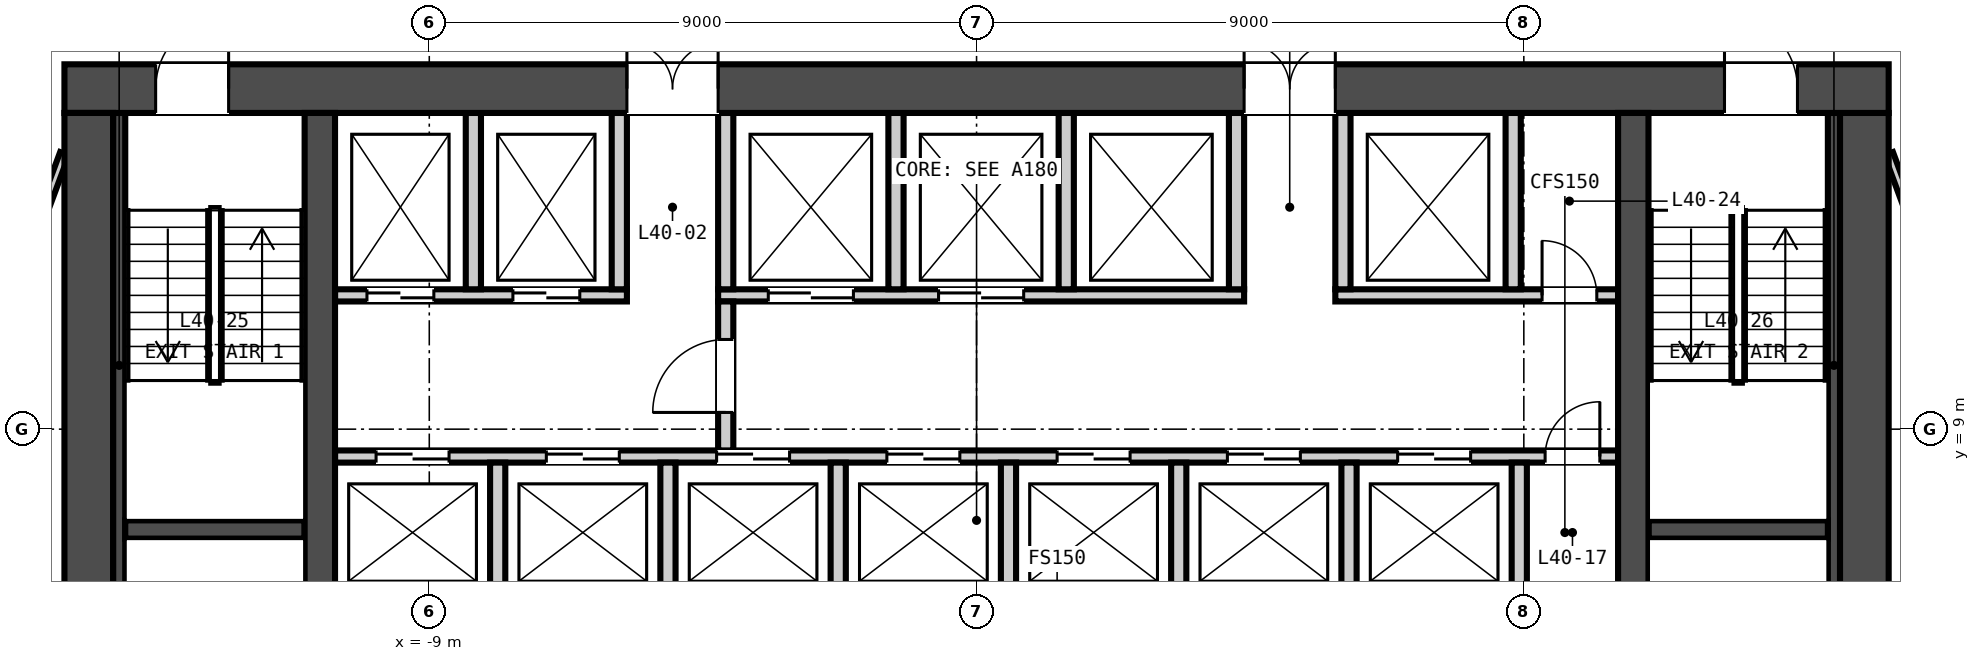
"""IFC4 building model, lengths in metres.
Left out: names, types, materials, properties, quantities, classifications, styles, units other than length and angle.
Written with IfcOpenShell. Run it as: python <this file> out.ifc"""

import sys

from ifc_helpers import new_model, si_unit, direction, frame, frame_2d, origin, place, context, subcontext, project, spatial, rectangle, extrude, element, fill, save


model = new_model("IFC4")
c1 = context("Model", 3, precision=1e-05, world=origin(), true_north=direction((0.0, 1.0)))
c2 = subcontext(c1, "Body", "Model", "MODEL_VIEW")
j1 = project(units=[si_unit("LENGTHUNIT", "METRE"), si_unit("PLANEANGLEUNIT", "RADIAN")], contexts=[c1])
p1 = place(None, origin())
s1 = spatial("IfcSite", under=j1, at=p1, CompositionType="ELEMENT")
p2 = place(p1, origin())
s2 = spatial("IfcBuilding", under=s1, at=p2, CompositionType="ELEMENT")
p3 = place(p2, frame((0.0, 0.0, 162.65)))
s3 = spatial("IfcBuildingStorey", under=s2, at=p3, CompositionType="ELEMENT", Elevation=162.65)
p4 = place(p3, frame((-15.0, 14.6, -0.15), z_axis=(0.0, 0.0, 1.0), x_axis=(1.0, 0.0, 0.0)))
e1 = element("IfcWall", 1, at=p4, inside=s3, PredefinedType="SOLIDWALL", context=c2, shape_type="SweptSolid", body=[
    extrude(rectangle(XDim=30.0, YDim=0.8, at=frame_2d((15.0, 0.0))), origin(), (0.0, 0.0, 1.0), 3.5),
])
p5 = place(p4, frame((9.25, 0.0, 0.15)))
e2 = element("IfcOpeningElement", 2, at=p5, cuts=e1, PredefinedType="OPENING", context=c2, shape_type="SweptSolid", body=[
    extrude(rectangle(XDim=1.5, YDim=2.1, at=frame_2d((0.75, 1.05))), frame((0.0, 0.41, 0.0), z_axis=(0.0, -1.0, 0.0), x_axis=(1.0, 0.0, 0.0)), (0.0, 0.0, 1.0), 0.82),
])
p6 = place(p4, frame((19.4, 0.0, 0.15)))
e3 = element("IfcOpeningElement", 3, at=p6, cuts=e1, PredefinedType="OPENING", context=c2, shape_type="SweptSolid", body=[
    extrude(rectangle(XDim=1.5, YDim=2.1, at=frame_2d((0.75, 1.05))), frame((0.0, 0.41, 0.0), z_axis=(0.0, -1.0, 0.0), x_axis=(1.0, 0.0, 0.0)), (0.0, 0.0, 1.0), 0.82),
])
p7 = place(p4, frame((1.5, 0.0, 0.15)))
e4 = element("IfcOpeningElement", 4, at=p7, cuts=e1, PredefinedType="OPENING", context=c2, shape_type="SweptSolid", body=[
    extrude(rectangle(XDim=1.2, YDim=2.1, at=frame_2d((0.6, 1.05))), frame((0.0, 0.41, 0.0), z_axis=(0.0, -1.0, 0.0), x_axis=(1.0, 0.0, 0.0)), (0.0, 0.0, 1.0), 0.82),
])
p8 = place(p4, frame((27.3, 0.0, 0.15)))
e5 = element("IfcOpeningElement", 5, at=p8, cuts=e1, PredefinedType="OPENING", context=c2, shape_type="SweptSolid", body=[
    extrude(rectangle(XDim=1.2, YDim=2.1, at=frame_2d((0.6, 1.05))), frame((0.0, 0.41, 0.0), z_axis=(0.0, -1.0, 0.0), x_axis=(1.0, 0.0, 0.0)), (0.0, 0.0, 1.0), 0.82),
])
for number, where, z_axis, x_axis in (
    (6, (-14.6, 0.8, -0.15), (0.0, 0.0, 1.0), (0.0, 1.0, 0.0)),
    (7, (14.6, 0.8, -0.15), (0.0, 0.0, 1.0), (0.0, 1.0, 0.0)),
):
    element("IfcWall", number, at=place(p3, frame(where, z_axis=z_axis, x_axis=x_axis)), inside=s3, PredefinedType="SOLIDWALL", context=c2, shape_type="SweptSolid", body=[
        extrude(rectangle(XDim=13.4, YDim=0.8, at=frame_2d((6.7, 0.0))), origin(), (0.0, 0.0, 1.0), 3.5),
    ])
for number, where, z_axis, x_axis in (
    (8, (-10.8, 0.8, -0.15), (0.0, 0.0, 1.0), (0.0, 1.0, 0.0)),
    (9, (10.8, 0.8, -0.15), (0.0, 0.0, 1.0), (0.0, 1.0, 0.0)),
):
    element("IfcWall", number, at=place(p3, frame(where, z_axis=z_axis, x_axis=x_axis)), inside=s3, PredefinedType="SOLIDWALL", context=c2, shape_type="SweptSolid", body=[
        extrude(rectangle(XDim=13.4, YDim=0.5, at=frame_2d((6.7, 0.0))), origin(), (0.0, 0.0, 1.0), 3.5),
    ])
p9 = place(p3, frame((-10.55, 8.55, 0.0), z_axis=(0.0, 0.0, 1.0), x_axis=(1.0, 0.0, 0.0)))
e10 = element("IfcWall", 10, at=p9, inside=s3, PredefinedType="PARTITIONING", context=c2, shape_type="SweptSolid", body=[
    extrude(rectangle(XDim=21.1, YDim=0.2, at=frame_2d((10.55, 0.0))), origin(), (0.0, 0.0, 1.0), 3.35),
])
p10 = place(p9, frame((0.675, 0.0, 0.0)))
e11 = element("IfcOpeningElement", 11, at=p10, cuts=e10, PredefinedType="OPENING", context=c2, shape_type="SweptSolid", body=[
    extrude(rectangle(XDim=1.2, YDim=2.1, at=frame_2d((0.6, 1.05))), frame((0.0, 0.11, 0.0), z_axis=(0.0, -1.0, 0.0), x_axis=(1.0, 0.0, 0.0)), (0.0, 0.0, 1.0), 0.22),
])
p11 = place(p9, frame((3.475, 0.0, 0.0)))
e12 = element("IfcOpeningElement", 12, at=p11, cuts=e10, PredefinedType="OPENING", context=c2, shape_type="SweptSolid", body=[
    extrude(rectangle(XDim=1.2, YDim=2.1, at=frame_2d((0.6, 1.05))), frame((0.0, 0.11, 0.0), z_axis=(0.0, -1.0, 0.0), x_axis=(1.0, 0.0, 0.0)), (0.0, 0.0, 1.0), 0.22),
])
p12 = place(p9, frame((6.275, 0.0, 0.0)))
e13 = element("IfcOpeningElement", 13, at=p12, cuts=e10, PredefinedType="OPENING", context=c2, shape_type="SweptSolid", body=[
    extrude(rectangle(XDim=1.2, YDim=2.1, at=frame_2d((0.6, 1.05))), frame((0.0, 0.11, 0.0), z_axis=(0.0, -1.0, 0.0), x_axis=(1.0, 0.0, 0.0)), (0.0, 0.0, 1.0), 0.22),
])
p13 = place(p9, frame((9.075, 0.0, 0.0)))
e14 = element("IfcOpeningElement", 14, at=p13, cuts=e10, PredefinedType="OPENING", context=c2, shape_type="SweptSolid", body=[
    extrude(rectangle(XDim=1.2, YDim=2.1, at=frame_2d((0.6, 1.05))), frame((0.0, 0.11, 0.0), z_axis=(0.0, -1.0, 0.0), x_axis=(1.0, 0.0, 0.0)), (0.0, 0.0, 1.0), 0.22),
])
p14 = place(p9, frame((11.875, 0.0, 0.0)))
e15 = element("IfcOpeningElement", 15, at=p14, cuts=e10, PredefinedType="OPENING", context=c2, shape_type="SweptSolid", body=[
    extrude(rectangle(XDim=1.2, YDim=2.1, at=frame_2d((0.6, 1.05))), frame((0.0, 0.11, 0.0), z_axis=(0.0, -1.0, 0.0), x_axis=(1.0, 0.0, 0.0)), (0.0, 0.0, 1.0), 0.22),
])
p15 = place(p9, frame((14.675, 0.0, 0.0)))
e16 = element("IfcOpeningElement", 16, at=p15, cuts=e10, PredefinedType="OPENING", context=c2, shape_type="SweptSolid", body=[
    extrude(rectangle(XDim=1.2, YDim=2.1, at=frame_2d((0.6, 1.05))), frame((0.0, 0.11, 0.0), z_axis=(0.0, -1.0, 0.0), x_axis=(1.0, 0.0, 0.0)), (0.0, 0.0, 1.0), 0.22),
])
p16 = place(p9, frame((17.475, 0.0, 0.0)))
e17 = element("IfcOpeningElement", 17, at=p16, cuts=e10, PredefinedType="OPENING", context=c2, shape_type="SweptSolid", body=[
    extrude(rectangle(XDim=1.2, YDim=2.1, at=frame_2d((0.6, 1.05))), frame((0.0, 0.11, 0.0), z_axis=(0.0, -1.0, 0.0), x_axis=(1.0, 0.0, 0.0)), (0.0, 0.0, 1.0), 0.22),
])
p17 = place(p9, frame((19.9, 0.0, 0.0)))
e18 = element("IfcOpeningElement", 18, at=p17, cuts=e10, PredefinedType="OPENING", context=c2, shape_type="SweptSolid", body=[
    extrude(rectangle(XDim=0.9, YDim=2.1, at=frame_2d((0.45, 1.05))), frame((0.0, 0.11, 0.0), z_axis=(0.0, -1.0, 0.0), x_axis=(1.0, 0.0, 0.0)), (0.0, 0.0, 1.0), 0.22),
])
p18 = place(p3, frame((-10.55, 11.2, 0.0), z_axis=(0.0, 0.0, 1.0), x_axis=(1.0, 0.0, 0.0)))
e19 = element("IfcWall", 19, at=p18, inside=s3, PredefinedType="PARTITIONING", context=c2, shape_type="SweptSolid", body=[
    extrude(rectangle(XDim=4.8, YDim=0.2, at=frame_2d((2.4, 0.0))), origin(), (0.0, 0.0, 1.0), 3.35),
])
p19 = place(p18, frame((0.525, 0.0, 0.0)))
e20 = element("IfcOpeningElement", 20, at=p19, cuts=e19, PredefinedType="OPENING", context=c2, shape_type="SweptSolid", body=[
    extrude(rectangle(XDim=1.1, YDim=2.1, at=frame_2d((0.55, 1.05))), frame((0.0, 0.11, 0.0), z_axis=(0.0, -1.0, 0.0), x_axis=(1.0, 0.0, 0.0)), (0.0, 0.0, 1.0), 0.22),
])
p20 = place(p18, frame((2.925, 0.0, 0.0)))
e21 = element("IfcOpeningElement", 21, at=p20, cuts=e19, PredefinedType="OPENING", context=c2, shape_type="SweptSolid", body=[
    extrude(rectangle(XDim=1.1, YDim=2.1, at=frame_2d((0.55, 1.05))), frame((0.0, 0.11, 0.0), z_axis=(0.0, -1.0, 0.0), x_axis=(1.0, 0.0, 0.0)), (0.0, 0.0, 1.0), 0.22),
])
p21 = place(p3, frame((-4.25, 11.2, 0.0), z_axis=(0.0, 0.0, 1.0), x_axis=(1.0, 0.0, 0.0)))
e22 = element("IfcWall", 22, at=p21, inside=s3, PredefinedType="PARTITIONING", context=c2, shape_type="SweptSolid", body=[
    extrude(rectangle(XDim=8.65, YDim=0.2, at=frame_2d((4.325, 0.0))), origin(), (0.0, 0.0, 1.0), 3.35),
])
p22 = place(p21, frame((0.825, 0.0, 0.0)))
e23 = element("IfcOpeningElement", 23, at=p22, cuts=e22, PredefinedType="OPENING", context=c2, shape_type="SweptSolid", body=[
    extrude(rectangle(XDim=1.4, YDim=2.1, at=frame_2d((0.7, 1.05))), frame((0.0, 0.11, 0.0), z_axis=(0.0, -1.0, 0.0), x_axis=(1.0, 0.0, 0.0)), (0.0, 0.0, 1.0), 0.22),
])
p23 = place(p21, frame((3.625, 0.0, 0.0)))
e24 = element("IfcOpeningElement", 24, at=p23, cuts=e22, PredefinedType="OPENING", context=c2, shape_type="SweptSolid", body=[
    extrude(rectangle(XDim=1.4, YDim=2.1, at=frame_2d((0.7, 1.05))), frame((0.0, 0.11, 0.0), z_axis=(0.0, -1.0, 0.0), x_axis=(1.0, 0.0, 0.0)), (0.0, 0.0, 1.0), 0.22),
])
p24 = place(p3, frame((5.9, 11.2, 0.0), z_axis=(0.0, 0.0, 1.0), x_axis=(1.0, 0.0, 0.0)))
e25 = element("IfcWall", 25, at=p24, inside=s3, PredefinedType="PARTITIONING", context=c2, shape_type="SweptSolid", body=[
    extrude(rectangle(XDim=4.65, YDim=0.2, at=frame_2d((2.325, 0.0))), origin(), (0.0, 0.0, 1.0), 3.35),
])
p25 = place(p24, frame((3.4, 0.0, 0.0)))
e26 = element("IfcOpeningElement", 26, at=p25, cuts=e25, PredefinedType="OPENING", context=c2, shape_type="SweptSolid", body=[
    extrude(rectangle(XDim=0.9, YDim=2.1, at=frame_2d((0.45, 1.05))), frame((0.0, 0.11, 0.0), z_axis=(0.0, -1.0, 0.0), x_axis=(1.0, 0.0, 0.0)), (0.0, 0.0, 1.0), 0.22),
])
p26 = place(p3, frame((-4.125, 8.65, 0.0), z_axis=(0.0, 0.0, 1.0), x_axis=(0.0, 1.0, 0.0)))
e27 = element("IfcWall", 27, at=p26, inside=s3, PredefinedType="PARTITIONING", context=c2, shape_type="SweptSolid", body=[
    extrude(rectangle(XDim=2.45, YDim=0.25, at=frame_2d((1.225, 0.0))), origin(), (0.0, 0.0, 1.0), 3.35),
])
p27 = place(p26, frame((0.625, 0.0, 0.0)))
e28 = element("IfcOpeningElement", 28, at=p27, cuts=e27, PredefinedType="OPENING", context=c2, shape_type="SweptSolid", body=[
    extrude(rectangle(XDim=1.2, YDim=2.1, at=frame_2d((0.6, 1.05))), frame((0.0, 0.135, 0.0), z_axis=(0.0, -1.0, 0.0), x_axis=(1.0, 0.0, 0.0)), (0.0, 0.0, 1.0), 0.27),
])
for number, where, z_axis, x_axis in (
    (29, (-7.875, 6.15, 0.0), (0.0, 0.0, 1.0), (0.0, 1.0, 0.0)),
    (30, (-5.075, 6.15, 0.0), (0.0, 0.0, 1.0), (0.0, 1.0, 0.0)),
    (31, (-2.275, 6.15, 0.0), (0.0, 0.0, 1.0), (0.0, 1.0, 0.0)),
    (32, (0.525, 6.15, 0.0), (0.0, 0.0, 1.0), (0.0, 1.0, 0.0)),
    (33, (3.325, 6.15, 0.0), (0.0, 0.0, 1.0), (0.0, 1.0, 0.0)),
    (34, (6.125, 6.15, 0.0), (0.0, 0.0, 1.0), (0.0, 1.0, 0.0)),
    (35, (8.925, 6.15, 0.0), (0.0, 0.0, 1.0), (0.0, 1.0, 0.0)),
):
    element("IfcWall", number, at=place(p3, frame(where, z_axis=z_axis, x_axis=x_axis)), inside=s3, PredefinedType="PARTITIONING", context=c2, shape_type="SweptSolid", body=[
        extrude(rectangle(XDim=2.3, YDim=0.25, at=frame_2d((1.15, 0.0))), origin(), (0.0, 0.0, 1.0), 3.35),
    ])
for number, where, z_axis, x_axis in (
    (36, (-8.275, 11.3, 0.0), (0.0, 0.0, 1.0), (0.0, 1.0, 0.0)),
    (37, (-5.875, 11.3, 0.0), (0.0, 0.0, 1.0), (0.0, 1.0, 0.0)),
    (38, (-4.125, 11.3, 0.0), (0.0, 0.0, 1.0), (0.0, 1.0, 0.0)),
    (39, (-1.325, 11.3, 0.0), (0.0, 0.0, 1.0), (0.0, 1.0, 0.0)),
    (40, (1.475, 11.3, 0.0), (0.0, 0.0, 1.0), (0.0, 1.0, 0.0)),
    (41, (4.275, 11.3, 0.0), (0.0, 0.0, 1.0), (0.0, 1.0, 0.0)),
    (42, (6.025, 11.3, 0.0), (0.0, 0.0, 1.0), (0.0, 1.0, 0.0)),
    (43, (8.825, 11.3, 0.0), (0.0, 0.0, 1.0), (0.0, 1.0, 0.0)),
):
    element("IfcWall", number, at=place(p3, frame(where, z_axis=z_axis, x_axis=x_axis)), inside=s3, PredefinedType="PARTITIONING", context=c2, shape_type="SweptSolid", body=[
        extrude(rectangle(XDim=2.9, YDim=0.25, at=frame_2d((1.45, 0.0))), origin(), (0.0, 0.0, 1.0), 3.35),
    ])
p28 = place(p3, frame((-14.0, 7.35, 0.0), z_axis=(0.0, 0.0, 1.0), x_axis=(1.0, 0.0, 0.0)))
e44 = element("IfcWall", 44, at=p28, inside=s3, PredefinedType="SOLIDWALL", context=c2, shape_type="SweptSolid", body=[
    extrude(rectangle(XDim=2.95, YDim=0.3, at=frame_2d((1.475, 0.0))), origin(), (0.0, 0.0, 1.0), 3.35),
])
p29 = place(p3, frame((-14.1, 0.8, 0.0), z_axis=(0.0, 0.0, 1.0), x_axis=(0.0, 1.0, 0.0)))
e45 = element("IfcWall", 45, at=p29, inside=s3, PredefinedType="SOLIDWALL", context=c2, shape_type="SweptSolid", body=[
    extrude(rectangle(XDim=13.4, YDim=0.2, at=frame_2d((6.7, 0.0))), origin(), (0.0, 0.0, 1.0), 3.35),
])
p30 = place(p3, frame((11.05, 7.35, 0.0), z_axis=(0.0, 0.0, 1.0), x_axis=(1.0, 0.0, 0.0)))
e46 = element("IfcWall", 46, at=p30, inside=s3, PredefinedType="SOLIDWALL", context=c2, shape_type="SweptSolid", body=[
    extrude(rectangle(XDim=2.95, YDim=0.3, at=frame_2d((1.475, 0.0))), origin(), (0.0, 0.0, 1.0), 3.35),
])
p31 = place(p3, frame((14.1, 0.8, 0.0), z_axis=(0.0, 0.0, 1.0), x_axis=(0.0, 1.0, 0.0)))
e47 = element("IfcWall", 47, at=p31, inside=s3, PredefinedType="SOLIDWALL", context=c2, shape_type="SweptSolid", body=[
    extrude(rectangle(XDim=13.4, YDim=0.2, at=frame_2d((6.7, 0.0))), origin(), (0.0, 0.0, 1.0), 3.35),
])
p32 = place(p3, frame((-15.0, 13.531, 0.0), z_axis=(0.0, 0.0, 1.0), x_axis=(-0.347347751601, -0.937736391241, 0.0)))
e48 = element("IfcWall", 48, at=p32, inside=s3, PredefinedType="PARTITIONING", context=c2, shape_type="SweptSolid", body=[
    extrude(rectangle(XDim=9.524, YDim=0.15, at=frame_2d((4.762, 0.0))), origin(), (0.0, 0.0, 1.0), 2.591),
])
p33 = place(p32, frame((4.262, 0.0, 0.0)))
e49 = element("IfcOpeningElement", 49, at=p33, cuts=e48, PredefinedType="OPENING", context=c2, shape_type="SweptSolid", body=[
    extrude(rectangle(XDim=1.0, YDim=2.1, at=frame_2d((0.5, 1.05))), frame((0.0, 0.085, 0.0), z_axis=(0.0, -1.0, 0.0), x_axis=(1.0, 0.0, 0.0)), (0.0, 0.0, 1.0), 0.17),
])
p34 = place(p3, frame((18.308, 4.6, 0.0), z_axis=(0.0, 0.0, 1.0), x_axis=(-0.347347751601, 0.937736391241, 0.0)))
e50 = element("IfcWall", 50, at=p34, inside=s3, PredefinedType="PARTITIONING", context=c2, shape_type="SweptSolid", body=[
    extrude(rectangle(XDim=9.524, YDim=0.15, at=frame_2d((4.762, 0.0))), origin(), (0.0, 0.0, 1.0), 2.591),
])
p35 = place(p34, frame((4.262, 0.0, 0.0)))
e51 = element("IfcOpeningElement", 51, at=p35, cuts=e50, PredefinedType="OPENING", context=c2, shape_type="SweptSolid", body=[
    extrude(rectangle(XDim=1.0, YDim=2.1, at=frame_2d((0.5, 1.05))), frame((0.0, 0.085, 0.0), z_axis=(0.0, -1.0, 0.0), x_axis=(1.0, 0.0, 0.0)), (0.0, 0.0, 1.0), 0.17),
])
p36 = place(p27, origin())
e52 = element("IfcDoor", 52, at=p36, inside=s3, OperationType="SINGLE_SWING_LEFT", PredefinedType="DOOR", context=c2, shape_type="SweptSolid", body=[
    extrude(rectangle(XDim=1.2, YDim=2.1, at=frame_2d((0.6, 1.05))), frame((0.0, 0.025, 0.0), z_axis=(0.0, -1.0, 0.0), x_axis=(1.0, 0.0, 0.0)), (0.0, 0.0, 1.0), 0.05),
])
fill(e28, e52)
p37 = place(p10, origin())
e53 = element("IfcDoor", 53, at=p37, inside=s3, OperationType="DOUBLE_DOOR_SLIDING", PredefinedType="DOOR", context=c2, shape_type="SweptSolid", body=[
    extrude(rectangle(XDim=1.2, YDim=2.1, at=frame_2d((0.6, 1.05))), frame((0.0, 0.025, 0.0), z_axis=(0.0, -1.0, 0.0), x_axis=(1.0, 0.0, 0.0)), (0.0, 0.0, 1.0), 0.05),
])
fill(e11, e53)
p38 = place(p11, origin())
e54 = element("IfcDoor", 54, at=p38, inside=s3, OperationType="DOUBLE_DOOR_SLIDING", PredefinedType="DOOR", context=c2, shape_type="SweptSolid", body=[
    extrude(rectangle(XDim=1.2, YDim=2.1, at=frame_2d((0.6, 1.05))), frame((0.0, 0.025, 0.0), z_axis=(0.0, -1.0, 0.0), x_axis=(1.0, 0.0, 0.0)), (0.0, 0.0, 1.0), 0.05),
])
fill(e12, e54)
p39 = place(p12, origin())
e55 = element("IfcDoor", 55, at=p39, inside=s3, OperationType="DOUBLE_DOOR_SLIDING", PredefinedType="DOOR", context=c2, shape_type="SweptSolid", body=[
    extrude(rectangle(XDim=1.2, YDim=2.1, at=frame_2d((0.6, 1.05))), frame((0.0, 0.025, 0.0), z_axis=(0.0, -1.0, 0.0), x_axis=(1.0, 0.0, 0.0)), (0.0, 0.0, 1.0), 0.05),
])
fill(e13, e55)
p40 = place(p13, origin())
e56 = element("IfcDoor", 56, at=p40, inside=s3, OperationType="DOUBLE_DOOR_SLIDING", PredefinedType="DOOR", context=c2, shape_type="SweptSolid", body=[
    extrude(rectangle(XDim=1.2, YDim=2.1, at=frame_2d((0.6, 1.05))), frame((0.0, 0.025, 0.0), z_axis=(0.0, -1.0, 0.0), x_axis=(1.0, 0.0, 0.0)), (0.0, 0.0, 1.0), 0.05),
])
fill(e14, e56)
p41 = place(p14, origin())
e57 = element("IfcDoor", 57, at=p41, inside=s3, OperationType="DOUBLE_DOOR_SLIDING", PredefinedType="DOOR", context=c2, shape_type="SweptSolid", body=[
    extrude(rectangle(XDim=1.2, YDim=2.1, at=frame_2d((0.6, 1.05))), frame((0.0, 0.025, 0.0), z_axis=(0.0, -1.0, 0.0), x_axis=(1.0, 0.0, 0.0)), (0.0, 0.0, 1.0), 0.05),
])
fill(e15, e57)
p42 = place(p15, origin())
e58 = element("IfcDoor", 58, at=p42, inside=s3, OperationType="DOUBLE_DOOR_SLIDING", PredefinedType="DOOR", context=c2, shape_type="SweptSolid", body=[
    extrude(rectangle(XDim=1.2, YDim=2.1, at=frame_2d((0.6, 1.05))), frame((0.0, 0.025, 0.0), z_axis=(0.0, -1.0, 0.0), x_axis=(1.0, 0.0, 0.0)), (0.0, 0.0, 1.0), 0.05),
])
fill(e16, e58)
p43 = place(p16, origin())
e59 = element("IfcDoor", 59, at=p43, inside=s3, OperationType="DOUBLE_DOOR_SLIDING", PredefinedType="DOOR", context=c2, shape_type="SweptSolid", body=[
    extrude(rectangle(XDim=1.2, YDim=2.1, at=frame_2d((0.6, 1.05))), frame((0.0, 0.025, 0.0), z_axis=(0.0, -1.0, 0.0), x_axis=(1.0, 0.0, 0.0)), (0.0, 0.0, 1.0), 0.05),
])
fill(e17, e59)
p44 = place(p17, origin())
e60 = element("IfcDoor", 60, at=p44, inside=s3, OperationType="SINGLE_SWING_RIGHT", PredefinedType="DOOR", context=c2, shape_type="SweptSolid", body=[
    extrude(rectangle(XDim=0.9, YDim=2.1, at=frame_2d((0.45, 1.05))), frame((0.0, 0.025, 0.0), z_axis=(0.0, -1.0, 0.0), x_axis=(1.0, 0.0, 0.0)), (0.0, 0.0, 1.0), 0.05),
])
fill(e18, e60)
p45 = place(p19, origin())
e61 = element("IfcDoor", 61, at=p45, inside=s3, OperationType="DOUBLE_DOOR_SLIDING", PredefinedType="DOOR", context=c2, shape_type="SweptSolid", body=[
    extrude(rectangle(XDim=1.1, YDim=2.1, at=frame_2d((0.55, 1.05))), frame((0.0, 0.025, 0.0), z_axis=(0.0, -1.0, 0.0), x_axis=(1.0, 0.0, 0.0)), (0.0, 0.0, 1.0), 0.05),
])
fill(e20, e61)
p46 = place(p20, origin())
e62 = element("IfcDoor", 62, at=p46, inside=s3, OperationType="DOUBLE_DOOR_SLIDING", PredefinedType="DOOR", context=c2, shape_type="SweptSolid", body=[
    extrude(rectangle(XDim=1.1, YDim=2.1, at=frame_2d((0.55, 1.05))), frame((0.0, 0.025, 0.0), z_axis=(0.0, -1.0, 0.0), x_axis=(1.0, 0.0, 0.0)), (0.0, 0.0, 1.0), 0.05),
])
fill(e21, e62)
p47 = place(p22, origin())
e63 = element("IfcDoor", 63, at=p47, inside=s3, OperationType="DOUBLE_DOOR_SLIDING", PredefinedType="DOOR", context=c2, shape_type="SweptSolid", body=[
    extrude(rectangle(XDim=1.4, YDim=2.1, at=frame_2d((0.7, 1.05))), frame((0.0, 0.025, 0.0), z_axis=(0.0, -1.0, 0.0), x_axis=(1.0, 0.0, 0.0)), (0.0, 0.0, 1.0), 0.05),
])
fill(e23, e63)
p48 = place(p23, origin())
e64 = element("IfcDoor", 64, at=p48, inside=s3, OperationType="DOUBLE_DOOR_SLIDING", PredefinedType="DOOR", context=c2, shape_type="SweptSolid", body=[
    extrude(rectangle(XDim=1.4, YDim=2.1, at=frame_2d((0.7, 1.05))), frame((0.0, 0.025, 0.0), z_axis=(0.0, -1.0, 0.0), x_axis=(1.0, 0.0, 0.0)), (0.0, 0.0, 1.0), 0.05),
])
fill(e24, e64)
p49 = place(p25, origin())
e65 = element("IfcDoor", 65, at=p49, inside=s3, OperationType="SINGLE_SWING_LEFT", PredefinedType="DOOR", context=c2, shape_type="SweptSolid", body=[
    extrude(rectangle(XDim=0.9, YDim=2.1, at=frame_2d((0.45, 1.05))), frame((0.0, 0.025, 0.0), z_axis=(0.0, -1.0, 0.0), x_axis=(1.0, 0.0, 0.0)), (0.0, 0.0, 1.0), 0.05),
])
fill(e26, e65)
p50 = place(p5, origin())
e66 = element("IfcDoor", 66, at=p50, inside=s3, OperationType="DOUBLE_DOOR_SINGLE_SWING", PredefinedType="DOOR", context=c2, shape_type="SweptSolid", body=[
    extrude(rectangle(XDim=1.5, YDim=2.1, at=frame_2d((0.75, 1.05))), frame((0.0, 0.025, 0.0), z_axis=(0.0, -1.0, 0.0), x_axis=(1.0, 0.0, 0.0)), (0.0, 0.0, 1.0), 0.05),
])
fill(e2, e66)
p51 = place(p6, origin())
e67 = element("IfcDoor", 67, at=p51, inside=s3, OperationType="DOUBLE_DOOR_SINGLE_SWING", PredefinedType="DOOR", context=c2, shape_type="SweptSolid", body=[
    extrude(rectangle(XDim=1.5, YDim=2.1, at=frame_2d((0.75, 1.05))), frame((0.0, 0.025, 0.0), z_axis=(0.0, -1.0, 0.0), x_axis=(1.0, 0.0, 0.0)), (0.0, 0.0, 1.0), 0.05),
])
fill(e3, e67)
p52 = place(p7, origin())
e68 = element("IfcDoor", 68, at=p52, inside=s3, OperationType="SINGLE_SWING_RIGHT", PredefinedType="DOOR", context=c2, shape_type="SweptSolid", body=[
    extrude(rectangle(XDim=1.2, YDim=2.1, at=frame_2d((0.6, 1.05))), frame((0.0, 0.025, 0.0), z_axis=(0.0, -1.0, 0.0), x_axis=(1.0, 0.0, 0.0)), (0.0, 0.0, 1.0), 0.05),
])
fill(e4, e68)
p53 = place(p8, origin())
e69 = element("IfcDoor", 69, at=p53, inside=s3, OperationType="SINGLE_SWING_LEFT", PredefinedType="DOOR", context=c2, shape_type="SweptSolid", body=[
    extrude(rectangle(XDim=1.2, YDim=2.1, at=frame_2d((0.6, 1.05))), frame((0.0, 0.025, 0.0), z_axis=(0.0, -1.0, 0.0), x_axis=(1.0, 0.0, 0.0)), (0.0, 0.0, 1.0), 0.05),
])
fill(e5, e69)
save(model, sys.argv[1])
